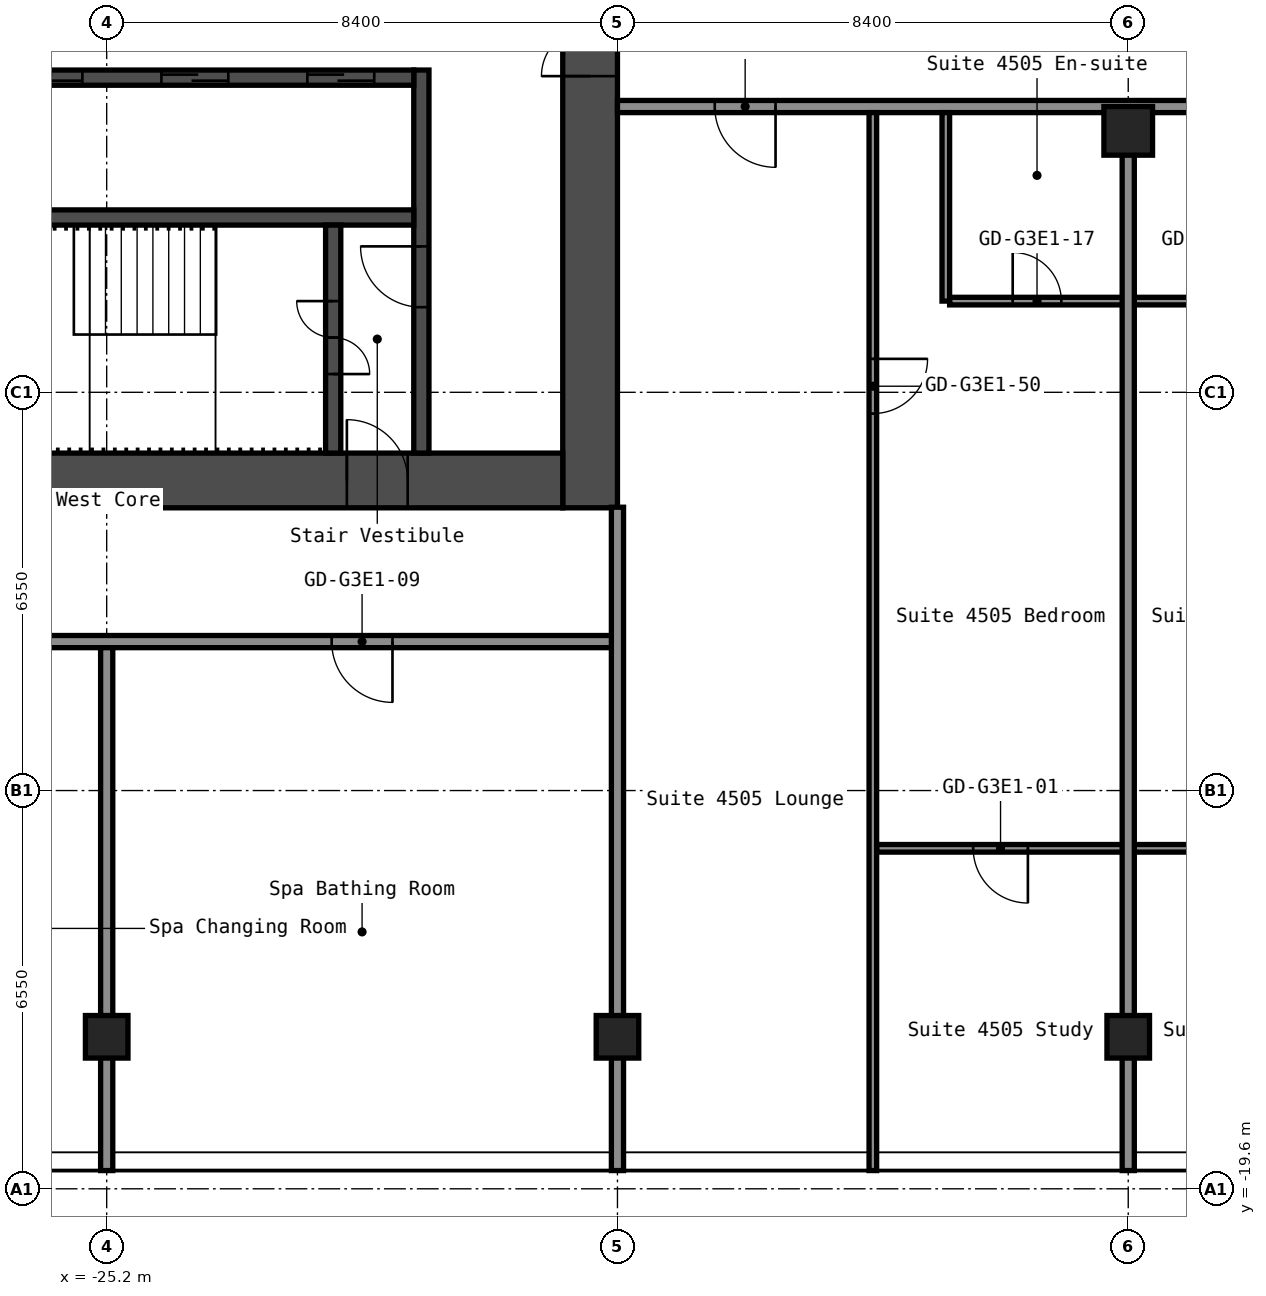
"""IFC4 building model, lengths in metres.
Left out: names, types, materials, properties, quantities, classifications, styles, units other than length and angle.
Written with IfcOpenShell. Run it as: python <this file> out.ifc"""

import sys

from ifc_helpers import new_model, si_unit, direction, frame, frame_2d, origin, origin_2d, place, context, subcontext, project, spatial, rectangle, hollow_rectangle, extrude, element, fill, save


model = new_model("IFC4")
c1 = context("Model", 3, precision=1e-05, world=origin(), true_north=direction((0.0, 1.0)))
c2 = subcontext(c1, "Body", "Model", "MODEL_VIEW")
j1 = project(units=[si_unit("LENGTHUNIT", "METRE"), si_unit("PLANEANGLEUNIT", "RADIAN")], contexts=[c1])
p1 = place(None, origin())
s1 = spatial("IfcSite", under=j1, at=p1, CompositionType="ELEMENT")
p2 = place(p1, origin())
s2 = spatial("IfcBuilding", under=s1, at=p2, CompositionType="ELEMENT")
p3 = place(p2, frame((0.0, 0.0, 159.8)))
s3 = spatial("IfcBuildingStorey", under=s2, at=p3, CompositionType="ELEMENT", Elevation=159.8)
for number, where, z_axis, x_axis in (
    (1, (-25.2, -17.1, 0.0), (0.0, 0.0, 1.0), (1.0, 0.0, 0.0)),
    (2, (-16.8, -17.1, 0.0), (0.0, 0.0, 1.0), (1.0, 0.0, 0.0)),
    (3, (-8.4, -17.1, 0.0), (0.0, 0.0, 1.0), (1.0, 0.0, 0.0)),
):
    element("IfcColumn", number, at=place(p3, frame(where, z_axis=z_axis, x_axis=x_axis)), inside=s3, PredefinedType="COLUMN", context=c2, shape_type="SweptSolid", body=[
        extrude(hollow_rectangle(XDim=0.7, YDim=0.7, WallThickness=0.028, at=origin_2d()), origin(), (0.0, 0.0, 1.0), 2.75),
    ])
p4 = place(p3, frame((-8.4, -2.2, 0.0), z_axis=(0.0, 0.0, 1.0), x_axis=(1.0, 0.0, 0.0)))
e4 = element("IfcColumn", 4, at=p4, inside=s3, PredefinedType="COLUMN", context=c2, shape_type="SweptSolid", body=[
    extrude(hollow_rectangle(XDim=0.8, YDim=0.8, WallThickness=0.032, at=origin_2d()), origin(), (0.0, 0.0, 1.0), 2.75),
])
p5 = place(p3, frame((-17.25, -8.4, 0.0), z_axis=(0.0, 0.0, 1.0), x_axis=(0.0, 1.0, 0.0)))
e5 = element("IfcWall", 5, at=p5, inside=s3, PredefinedType="SHEAR", context=c2, shape_type="SweptSolid", body=[
    extrude(rectangle(XDim=16.8, YDim=0.9, at=frame_2d((8.4, 0.0))), origin(), (0.0, 0.0, 1.0), 2.75),
])
p6 = place(p5, frame((7.1, 0.0, 0.0)))
e6 = element("IfcOpeningElement", 6, at=p6, cuts=e5, PredefinedType="OPENING", context=c2, shape_type="SweptSolid", body=[
    extrude(rectangle(XDim=1.6, YDim=2.1, at=frame_2d((0.8, 1.05))), frame((0.0, 0.46, 0.0), z_axis=(0.0, -1.0, 0.0), x_axis=(1.0, 0.0, 0.0)), (0.0, 0.0, 1.0), 0.92),
])
p7 = place(p3, frame((-32.7, -7.95, 0.0), z_axis=(0.0, 0.0, 1.0), x_axis=(1.0, 0.0, 0.0)))
e7 = element("IfcWall", 7, at=p7, inside=s3, PredefinedType="SHEAR", context=c2, shape_type="SweptSolid", body=[
    extrude(rectangle(XDim=15.0, YDim=0.9, at=frame_2d((7.5, 0.0))), origin(), (0.0, 0.0, 1.0), 2.75),
])
p8 = place(p7, frame((11.45, 0.0, 0.0)))
e8 = element("IfcOpeningElement", 8, at=p8, cuts=e7, PredefinedType="OPENING", context=c2, shape_type="SweptSolid", body=[
    extrude(rectangle(XDim=1.0, YDim=2.1, at=frame_2d((0.5, 1.05))), frame((0.0, 0.46, 0.0), z_axis=(0.0, -1.0, 0.0), x_axis=(1.0, 0.0, 0.0)), (0.0, 0.0, 1.0), 0.92),
])
p9 = place(p3, frame((-20.025, -7.5, 0.0), z_axis=(0.0, 0.0, 1.0), x_axis=(0.0, 1.0, 0.0)))
e9 = element("IfcWall", 9, at=p9, inside=s3, PredefinedType="SHEAR", context=c2, shape_type="SweptSolid", body=[
    extrude(rectangle(XDim=6.3, YDim=0.25, at=frame_2d((3.15, 0.0))), origin(), (0.0, 0.0, 1.0), 2.75),
])
p10 = place(p9, frame((2.4, 0.0, 0.0)))
e10 = element("IfcOpeningElement", 10, at=p10, cuts=e9, PredefinedType="OPENING", context=c2, shape_type="SweptSolid", body=[
    extrude(rectangle(XDim=1.0, YDim=2.1, at=frame_2d((0.5, 1.05))), frame((0.0, 0.135, 0.0), z_axis=(0.0, -1.0, 0.0), x_axis=(1.0, 0.0, 0.0)), (0.0, 0.0, 1.0), 0.27),
])
p11 = place(p3, frame((-27.65, -1.325, 0.0), z_axis=(0.0, 0.0, 1.0), x_axis=(1.0, 0.0, 0.0)))
e11 = element("IfcWall", 11, at=p11, inside=s3, PredefinedType="SHEAR", context=c2, shape_type="SweptSolid", body=[
    extrude(rectangle(XDim=7.5, YDim=0.25, at=frame_2d((3.75, 0.0))), origin(), (0.0, 0.0, 1.0), 2.75),
])
p12 = place(p11, frame((5.75, 0.0, 0.0)))
e12 = element("IfcOpeningElement", 12, at=p12, cuts=e11, PredefinedType="OPENING", context=c2, shape_type="SweptSolid", body=[
    extrude(rectangle(XDim=1.1, YDim=2.1, at=frame_2d((0.55, 1.05))), frame((0.0, 0.135, 0.0), z_axis=(0.0, -1.0, 0.0), x_axis=(1.0, 0.0, 0.0)), (0.0, 0.0, 1.0), 0.27),
])
p13 = place(p11, frame((3.35, 0.0, 0.0)))
e13 = element("IfcOpeningElement", 13, at=p13, cuts=e11, PredefinedType="OPENING", context=c2, shape_type="SweptSolid", body=[
    extrude(rectangle(XDim=1.1, YDim=2.1, at=frame_2d((0.55, 1.05))), frame((0.0, 0.135, 0.0), z_axis=(0.0, -1.0, 0.0), x_axis=(1.0, 0.0, 0.0)), (0.0, 0.0, 1.0), 0.27),
])
p14 = place(p11, frame((0.95, 0.0, 0.0)))
e14 = element("IfcOpeningElement", 14, at=p14, cuts=e11, PredefinedType="OPENING", context=c2, shape_type="SweptSolid", body=[
    extrude(rectangle(XDim=1.1, YDim=2.1, at=frame_2d((0.55, 1.05))), frame((0.0, 0.135, 0.0), z_axis=(0.0, -1.0, 0.0), x_axis=(1.0, 0.0, 0.0)), (0.0, 0.0, 1.0), 0.27),
])
p15 = place(p3, frame((-27.65, -3.625, 0.0), z_axis=(0.0, 0.0, 1.0), x_axis=(1.0, 0.0, 0.0)))
e15 = element("IfcWall", 15, at=p15, inside=s3, PredefinedType="SHEAR", context=c2, shape_type="SweptSolid", body=[
    extrude(rectangle(XDim=7.5, YDim=0.25, at=frame_2d((3.75, 0.0))), origin(), (0.0, 0.0, 1.0), 2.75),
])
p16 = place(p3, frame((-21.475, -7.5, 0.0), z_axis=(0.0, 0.0, 1.0), x_axis=(0.0, 1.0, 0.0)))
e16 = element("IfcWall", 16, at=p16, inside=s3, PredefinedType="SHEAR", context=c2, shape_type="SweptSolid", body=[
    extrude(rectangle(XDim=3.75, YDim=0.25, at=frame_2d((1.875, 0.0))), origin(), (0.0, 0.0, 1.0), 2.75),
])
p17 = place(p16, frame((1.3, 0.0, 0.0)))
e17 = element("IfcOpeningElement", 17, at=p17, cuts=e16, PredefinedType="OPENING", context=c2, shape_type="SweptSolid", body=[
    extrude(rectangle(XDim=1.2, YDim=2.1, at=frame_2d((0.6, 1.05))), frame((0.0, 0.135, 0.0), z_axis=(0.0, -1.0, 0.0), x_axis=(1.0, 0.0, 0.0)), (0.0, 0.0, 1.0), 0.27),
])
p18 = place(p3, frame((-12.538, -14.0, 0.0), z_axis=(0.0, 0.0, 1.0), x_axis=(1.0, 0.0, 0.0)))
e18 = element("IfcWall", 18, at=p18, inside=s3, PredefinedType="PARTITIONING", context=c2, shape_type="SweptSolid", body=[
    extrude(rectangle(XDim=8.275, YDim=0.125, at=frame_2d((4.138, 0.0))), origin(), (0.0, 0.0, 1.0), 2.75),
])
p19 = place(p18, frame((1.587, 0.0, 0.0)))
e19 = element("IfcOpeningElement", 19, at=p19, cuts=e18, PredefinedType="OPENING", context=c2, shape_type="SweptSolid", body=[
    extrude(rectangle(XDim=0.9, YDim=2.1, at=frame_2d((0.45, 1.05))), frame((0.0, 0.073, 0.0), z_axis=(0.0, -1.0, 0.0), x_axis=(1.0, 0.0, 0.0)), (0.0, 0.0, 1.0), 0.145),
])
p20 = place(p18, frame((5.788, 0.0, 0.0)))
e20 = element("IfcOpeningElement", 20, at=p20, cuts=e18, PredefinedType="OPENING", context=c2, shape_type="SweptSolid", body=[
    extrude(rectangle(XDim=0.9, YDim=2.1, at=frame_2d((0.45, 1.05))), frame((0.0, 0.073, 0.0), z_axis=(0.0, -1.0, 0.0), x_axis=(1.0, 0.0, 0.0)), (0.0, 0.0, 1.0), 0.145),
])
p21 = place(p3, frame((-42.7, -10.6, 0.0), z_axis=(0.0, 0.0, 1.0), x_axis=(1.0, 0.0, 0.0)))
e21 = element("IfcWall", 21, at=p21, inside=s3, PredefinedType="PARTITIONING", context=c2, shape_type="SweptSolid", body=[
    extrude(rectangle(XDim=25.9, YDim=0.2, at=frame_2d((12.95, 0.0))), origin(), (0.0, 0.0, 1.0), 2.75),
])
p22 = place(p21, frame((1.785, 0.0, 0.0)))
e22 = element("IfcOpeningElement", 22, at=p22, cuts=e21, PredefinedType="OPENING", context=c2, shape_type="SweptSolid", body=[
    extrude(rectangle(XDim=0.9, YDim=2.1, at=frame_2d((0.45, 1.05))), frame((0.0, 0.11, 0.0), z_axis=(0.0, -1.0, 0.0), x_axis=(1.0, 0.0, 0.0)), (0.0, 0.0, 1.0), 0.22),
])
p23 = place(p21, frame((6.185, 0.0, 0.0)))
e23 = element("IfcOpeningElement", 23, at=p23, cuts=e21, PredefinedType="OPENING", context=c2, shape_type="SweptSolid", body=[
    extrude(rectangle(XDim=0.9, YDim=2.1, at=frame_2d((0.45, 1.05))), frame((0.0, 0.11, 0.0), z_axis=(0.0, -1.0, 0.0), x_axis=(1.0, 0.0, 0.0)), (0.0, 0.0, 1.0), 0.22),
])
p24 = place(p21, frame((10.92, 0.0, 0.0)))
e24 = element("IfcOpeningElement", 24, at=p24, cuts=e21, PredefinedType="OPENING", context=c2, shape_type="SweptSolid", body=[
    extrude(rectangle(XDim=0.9, YDim=2.1, at=frame_2d((0.45, 1.05))), frame((0.0, 0.11, 0.0), z_axis=(0.0, -1.0, 0.0), x_axis=(1.0, 0.0, 0.0)), (0.0, 0.0, 1.0), 0.22),
])
p25 = place(p21, frame((15.12, 0.0, 0.0)))
e25 = element("IfcOpeningElement", 25, at=p25, cuts=e21, PredefinedType="OPENING", context=c2, shape_type="SweptSolid", body=[
    extrude(rectangle(XDim=0.9, YDim=2.1, at=frame_2d((0.45, 1.05))), frame((0.0, 0.11, 0.0), z_axis=(0.0, -1.0, 0.0), x_axis=(1.0, 0.0, 0.0)), (0.0, 0.0, 1.0), 0.22),
])
p26 = place(p21, frame((21.2, 0.0, 0.0)))
e26 = element("IfcOpeningElement", 26, at=p26, cuts=e21, PredefinedType="OPENING", context=c2, shape_type="SweptSolid", body=[
    extrude(rectangle(XDim=1.0, YDim=2.1, at=frame_2d((0.5, 1.05))), frame((0.0, 0.11, 0.0), z_axis=(0.0, -1.0, 0.0), x_axis=(1.0, 0.0, 0.0)), (0.0, 0.0, 1.0), 0.22),
])
p27 = place(p3, frame((-11.337, -5.0, 0.0), z_axis=(0.0, 0.0, 1.0), x_axis=(1.0, 0.0, 0.0)))
e27 = element("IfcWall", 27, at=p27, inside=s3, PredefinedType="PARTITIONING", context=c2, shape_type="SweptSolid", body=[
    extrude(rectangle(XDim=5.875, YDim=0.125, at=frame_2d((2.938, 0.0))), origin(), (0.0, 0.0, 1.0), 2.75),
])
p28 = place(p27, frame((1.038, 0.0, 0.0)))
e28 = element("IfcOpeningElement", 28, at=p28, cuts=e27, PredefinedType="OPENING", context=c2, shape_type="SweptSolid", body=[
    extrude(rectangle(XDim=0.8, YDim=2.1, at=frame_2d((0.4, 1.05))), frame((0.0, 0.073, 0.0), z_axis=(0.0, -1.0, 0.0), x_axis=(1.0, 0.0, 0.0)), (0.0, 0.0, 1.0), 0.145),
])
p29 = place(p27, frame((4.038, 0.0, 0.0)))
e29 = element("IfcOpeningElement", 29, at=p29, cuts=e27, PredefinedType="OPENING", context=c2, shape_type="SweptSolid", body=[
    extrude(rectangle(XDim=0.8, YDim=2.1, at=frame_2d((0.4, 1.05))), frame((0.0, 0.073, 0.0), z_axis=(0.0, -1.0, 0.0), x_axis=(1.0, 0.0, 0.0)), (0.0, 0.0, 1.0), 0.145),
])
p30 = place(p3, frame((-16.8, -1.8, 0.0), z_axis=(0.0, 0.0, 1.0), x_axis=(1.0, 0.0, 0.0)))
e30 = element("IfcWall", 30, at=p30, inside=s3, PredefinedType="PARTITIONING", context=c2, shape_type="SweptSolid", body=[
    extrude(rectangle(XDim=33.6, YDim=0.2, at=frame_2d((16.8, 0.0))), origin(), (0.0, 0.0, 1.0), 2.75),
])
p31 = place(p30, frame((1.6, 0.0, 0.0)))
e31 = element("IfcOpeningElement", 31, at=p31, cuts=e30, PredefinedType="OPENING", context=c2, shape_type="SweptSolid", body=[
    extrude(rectangle(XDim=1.0, YDim=2.1, at=frame_2d((0.5, 1.05))), frame((0.0, 0.11, 0.0), z_axis=(0.0, -1.0, 0.0), x_axis=(1.0, 0.0, 0.0)), (0.0, 0.0, 1.0), 0.22),
])
p32 = place(p30, frame((14.2, 0.0, 0.0)))
e32 = element("IfcOpeningElement", 32, at=p32, cuts=e30, PredefinedType="OPENING", context=c2, shape_type="SweptSolid", body=[
    extrude(rectangle(XDim=1.0, YDim=2.1, at=frame_2d((0.5, 1.05))), frame((0.0, 0.11, 0.0), z_axis=(0.0, -1.0, 0.0), x_axis=(1.0, 0.0, 0.0)), (0.0, 0.0, 1.0), 0.22),
])
p33 = place(p30, frame((22.6, 0.0, 0.0)))
e33 = element("IfcOpeningElement", 33, at=p33, cuts=e30, PredefinedType="OPENING", context=c2, shape_type="SweptSolid", body=[
    extrude(rectangle(XDim=1.0, YDim=2.1, at=frame_2d((0.5, 1.05))), frame((0.0, 0.11, 0.0), z_axis=(0.0, -1.0, 0.0), x_axis=(1.0, 0.0, 0.0)), (0.0, 0.0, 1.0), 0.22),
])
p34 = place(p30, frame((31.0, 0.0, 0.0)))
e34 = element("IfcOpeningElement", 34, at=p34, cuts=e30, PredefinedType="OPENING", context=c2, shape_type="SweptSolid", body=[
    extrude(rectangle(XDim=1.0, YDim=2.1, at=frame_2d((0.5, 1.05))), frame((0.0, 0.11, 0.0), z_axis=(0.0, -1.0, 0.0), x_axis=(1.0, 0.0, 0.0)), (0.0, 0.0, 1.0), 0.22),
])
p35 = place(p3, frame((-25.2, -19.3, 0.0), z_axis=(0.0, 0.0, 1.0), x_axis=(0.0, 1.0, 0.0)))
e35 = element("IfcWall", 35, at=p35, inside=s3, PredefinedType="PARTITIONING", context=c2, shape_type="SweptSolid", body=[
    extrude(rectangle(XDim=8.6, YDim=0.2, at=frame_2d((4.3, 0.0))), origin(), (0.0, 0.0, 1.0), 2.75),
])
p36 = place(p3, frame((-16.8, -19.3, 0.0), z_axis=(0.0, 0.0, 1.0), x_axis=(0.0, 1.0, 0.0)))
e36 = element("IfcWall", 36, at=p36, inside=s3, PredefinedType="PARTITIONING", context=c2, shape_type="SweptSolid", body=[
    extrude(rectangle(XDim=10.91, YDim=0.2, at=frame_2d((5.455, 0.0))), origin(), (0.0, 0.0, 1.0), 2.75),
])
p37 = place(p3, frame((-12.6, -19.3, 0.0), z_axis=(0.0, 0.0, 1.0), x_axis=(0.0, 1.0, 0.0)))
e37 = element("IfcWall", 37, at=p37, inside=s3, PredefinedType="PARTITIONING", context=c2, shape_type="SweptSolid", body=[
    extrude(rectangle(XDim=17.4, YDim=0.125, at=frame_2d((8.7, 0.0))), origin(), (0.0, 0.0, 1.0), 2.75),
])
p38 = place(p37, frame((12.45, 0.0, 0.0)))
e38 = element("IfcOpeningElement", 38, at=p38, cuts=e37, PredefinedType="OPENING", context=c2, shape_type="SweptSolid", body=[
    extrude(rectangle(XDim=0.9, YDim=2.1, at=frame_2d((0.45, 1.05))), frame((0.0, 0.073, 0.0), z_axis=(0.0, -1.0, 0.0), x_axis=(1.0, 0.0, 0.0)), (0.0, 0.0, 1.0), 0.145),
])
p39 = place(p3, frame((-11.4, -5.0, 0.0), z_axis=(0.0, 0.0, 1.0), x_axis=(0.0, 1.0, 0.0)))
e39 = element("IfcWall", 39, at=p39, inside=s3, PredefinedType="PARTITIONING", context=c2, shape_type="SweptSolid", body=[
    extrude(rectangle(XDim=3.1, YDim=0.125, at=frame_2d((1.55, 0.0))), origin(), (0.0, 0.0, 1.0), 2.75),
])
p40 = place(p3, frame((-8.4, -19.3, 0.0), z_axis=(0.0, 0.0, 1.0), x_axis=(0.0, 1.0, 0.0)))
e40 = element("IfcWall", 40, at=p40, inside=s3, PredefinedType="PARTITIONING", context=c2, shape_type="SweptSolid", body=[
    extrude(rectangle(XDim=16.71, YDim=0.2, at=frame_2d((8.355, 0.0))), origin(), (0.0, 0.0, 1.0), 2.75),
])
p41 = place(p6, origin())
e41 = element("IfcDoor", 41, at=p41, inside=s3, OperationType="DOUBLE_DOOR_SINGLE_SWING", PredefinedType="DOOR", context=c2, shape_type="SweptSolid", body=[
    extrude(rectangle(XDim=1.6, YDim=2.1, at=frame_2d((0.8, 1.05))), frame((0.0, 0.025, 0.0), z_axis=(0.0, -1.0, 0.0), x_axis=(1.0, 0.0, 0.0)), (0.0, 0.0, 1.0), 0.05),
])
fill(e6, e41)
p42 = place(p8, origin())
e42 = element("IfcDoor", 42, at=p42, inside=s3, OperationType="SINGLE_SWING_RIGHT", PredefinedType="DOOR", context=c2, shape_type="SweptSolid", body=[
    extrude(rectangle(XDim=1.0, YDim=2.1, at=frame_2d((0.5, 1.05))), frame((0.0, 0.025, 0.0), z_axis=(0.0, -1.0, 0.0), x_axis=(1.0, 0.0, 0.0)), (0.0, 0.0, 1.0), 0.05),
])
fill(e8, e42)
p43 = place(p17, origin())
e43 = element("IfcDoor", 43, at=p43, inside=s3, OperationType="DOUBLE_DOOR_SINGLE_SWING", PredefinedType="DOOR", context=c2, shape_type="SweptSolid", body=[
    extrude(rectangle(XDim=1.2, YDim=2.1, at=frame_2d((0.6, 1.05))), frame((0.0, 0.025, 0.0), z_axis=(0.0, -1.0, 0.0), x_axis=(1.0, 0.0, 0.0)), (0.0, 0.0, 1.0), 0.05),
])
fill(e17, e43)
p44 = place(p10, origin())
e44 = element("IfcDoor", 44, at=p44, inside=s3, OperationType="SINGLE_SWING_LEFT", PredefinedType="DOOR", context=c2, shape_type="SweptSolid", body=[
    extrude(rectangle(XDim=1.0, YDim=2.1, at=frame_2d((0.5, 1.05))), frame((0.0, 0.025, 0.0), z_axis=(0.0, -1.0, 0.0), x_axis=(1.0, 0.0, 0.0)), (0.0, 0.0, 1.0), 0.05),
])
fill(e10, e44)
p45 = place(p12, origin())
e45 = element("IfcDoor", 45, at=p45, inside=s3, OperationType="DOUBLE_DOOR_SLIDING", PredefinedType="DOOR", context=c2, shape_type="SweptSolid", body=[
    extrude(rectangle(XDim=1.1, YDim=2.1, at=frame_2d((0.55, 1.05))), frame((0.0, 0.025, 0.0), z_axis=(0.0, -1.0, 0.0), x_axis=(1.0, 0.0, 0.0)), (0.0, 0.0, 1.0), 0.05),
])
fill(e12, e45)
p46 = place(p13, origin())
e46 = element("IfcDoor", 46, at=p46, inside=s3, OperationType="DOUBLE_DOOR_SLIDING", PredefinedType="DOOR", context=c2, shape_type="SweptSolid", body=[
    extrude(rectangle(XDim=1.1, YDim=2.1, at=frame_2d((0.55, 1.05))), frame((0.0, 0.025, 0.0), z_axis=(0.0, -1.0, 0.0), x_axis=(1.0, 0.0, 0.0)), (0.0, 0.0, 1.0), 0.05),
])
fill(e13, e46)
p47 = place(p14, origin())
e47 = element("IfcDoor", 47, at=p47, inside=s3, OperationType="DOUBLE_DOOR_SLIDING", PredefinedType="DOOR", context=c2, shape_type="SweptSolid", body=[
    extrude(rectangle(XDim=1.1, YDim=2.1, at=frame_2d((0.55, 1.05))), frame((0.0, 0.025, 0.0), z_axis=(0.0, -1.0, 0.0), x_axis=(1.0, 0.0, 0.0)), (0.0, 0.0, 1.0), 0.05),
])
fill(e14, e47)
p48 = place(p19, origin())
e48 = element("IfcDoor", 48, at=p48, inside=s3, OperationType="SINGLE_SWING_RIGHT", PredefinedType="DOOR", context=c2, shape_type="SweptSolid", body=[
    extrude(rectangle(XDim=0.9, YDim=2.1, at=frame_2d((0.45, 1.05))), frame((0.0, 0.025, 0.0), z_axis=(0.0, -1.0, 0.0), x_axis=(1.0, 0.0, 0.0)), (0.0, 0.0, 1.0), 0.05),
])
fill(e19, e48)
p49 = place(p26, origin())
e49 = element("IfcDoor", 49, at=p49, inside=s3, OperationType="SINGLE_SWING_RIGHT", PredefinedType="DOOR", context=c2, shape_type="SweptSolid", body=[
    extrude(rectangle(XDim=1.0, YDim=2.1, at=frame_2d((0.5, 1.05))), frame((0.0, 0.025, 0.0), z_axis=(0.0, -1.0, 0.0), x_axis=(1.0, 0.0, 0.0)), (0.0, 0.0, 1.0), 0.05),
])
fill(e26, e49)
p50 = place(p28, origin())
e50 = element("IfcDoor", 50, at=p50, inside=s3, OperationType="SINGLE_SWING_RIGHT", PredefinedType="DOOR", context=c2, shape_type="SweptSolid", body=[
    extrude(rectangle(XDim=0.8, YDim=2.1, at=frame_2d((0.4, 1.05))), frame((0.0, 0.025, 0.0), z_axis=(0.0, -1.0, 0.0), x_axis=(1.0, 0.0, 0.0)), (0.0, 0.0, 1.0), 0.05),
])
fill(e28, e50)
p51 = place(p31, origin())
e51 = element("IfcDoor", 51, at=p51, inside=s3, OperationType="SINGLE_SWING_RIGHT", PredefinedType="DOOR", context=c2, shape_type="SweptSolid", body=[
    extrude(rectangle(XDim=1.0, YDim=2.1, at=frame_2d((0.5, 1.05))), frame((0.0, 0.025, 0.0), z_axis=(0.0, -1.0, 0.0), x_axis=(1.0, 0.0, 0.0)), (0.0, 0.0, 1.0), 0.05),
])
fill(e31, e51)
p52 = place(p38, origin())
e52 = element("IfcDoor", 52, at=p52, inside=s3, OperationType="SINGLE_SWING_RIGHT", PredefinedType="DOOR", context=c2, shape_type="SweptSolid", body=[
    extrude(rectangle(XDim=0.9, YDim=2.1, at=frame_2d((0.45, 1.05))), frame((0.0, 0.025, 0.0), z_axis=(0.0, -1.0, 0.0), x_axis=(1.0, 0.0, 0.0)), (0.0, 0.0, 1.0), 0.05),
])
fill(e38, e52)
save(model, sys.argv[1])
